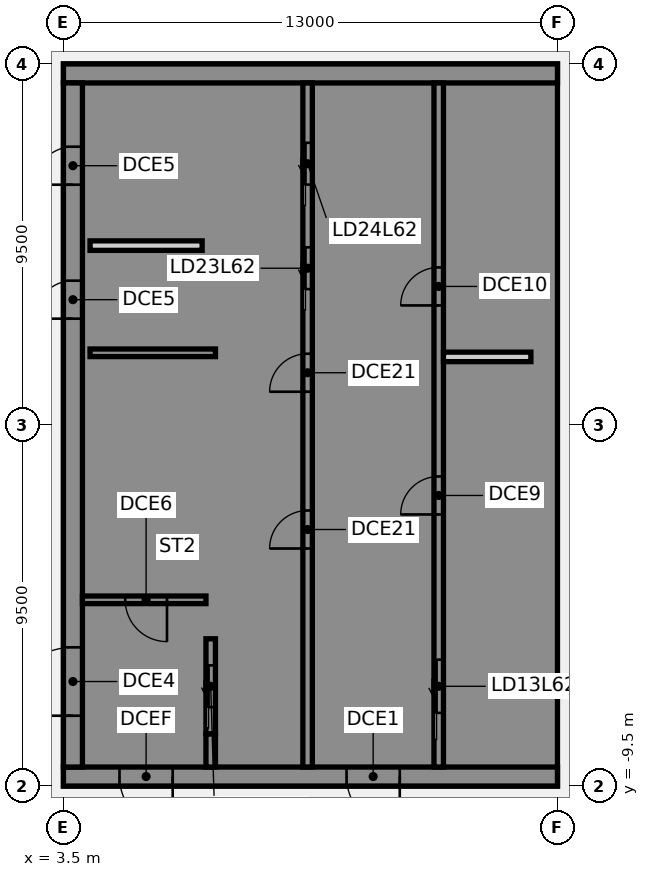
"""IFC4 building model, lengths in metres.
Left out: names, types, materials, properties, quantities, classifications, styles, units other than length and angle.
Written with IfcOpenShell. Run it as: python <this file> out.ifc"""

import sys

from ifc_helpers import new_model, si_unit, direction, frame, frame_2d, origin, place, context, subcontext, project, spatial, polyline, rectangle, outline, extrude, element, fill, save


model = new_model("IFC4")
c1 = context("Model", 3, precision=1e-05, world=origin(), true_north=direction((0.0, 1.0)))
c2 = subcontext(c1, "Body", "Model", "MODEL_VIEW")
j1 = project(units=[si_unit("LENGTHUNIT", "METRE"), si_unit("PLANEANGLEUNIT", "RADIAN")], contexts=[c1])
p1 = place(None, origin())
s1 = spatial("IfcSite", under=j1, at=p1, CompositionType="ELEMENT")
p2 = place(p1, origin())
s2 = spatial("IfcBuilding", under=s1, at=p2, CompositionType="ELEMENT")
p3 = place(p2, frame((0.0, 0.0, 245.1)))
s3 = spatial("IfcBuildingStorey", under=s2, at=p3, CompositionType="ELEMENT", Elevation=245.1)
p4 = place(p3, frame((16.5, -9.25, 0.0), z_axis=(0.0, 0.0, 1.0), x_axis=(-1.0, 0.0, 0.0)))
e1 = element("IfcWall", 1, at=p4, inside=s3, PredefinedType="SHEAR", context=c2, shape_type="SweptSolid", body=[
    extrude(rectangle(XDim=13.0, YDim=0.5, at=frame_2d((6.5, 0.0))), origin(), (0.0, 0.0, 1.0), 3.46),
])
p5 = place(p4, frame((4.15, 0.0, 0.0)))
e2 = element("IfcOpeningElement", 2, at=p5, cuts=e1, PredefinedType="OPENING", context=c2, shape_type="SweptSolid", body=[
    extrude(rectangle(XDim=1.4, YDim=2.1, at=frame_2d((0.7, 1.05))), frame((0.0, 0.26, 0.0), z_axis=(0.0, -1.0, 0.0), x_axis=(1.0, 0.0, 0.0)), (0.0, 0.0, 1.0), 0.52),
])
p6 = place(p4, frame((10.125, 0.0, 0.0)))
e3 = element("IfcOpeningElement", 3, at=p6, cuts=e1, PredefinedType="OPENING", context=c2, shape_type="SweptSolid", body=[
    extrude(rectangle(XDim=1.4, YDim=2.1, at=frame_2d((0.7, 1.05))), frame((0.0, 0.26, 0.0), z_axis=(0.0, -1.0, 0.0), x_axis=(1.0, 0.0, 0.0)), (0.0, 0.0, 1.0), 0.52),
])
p7 = place(p3, origin())
e4 = element("IfcWall", 4, at=p7, inside=s3, PredefinedType="SHEAR", context=c2, shape_type="SweptSolid", body=[
    extrude(outline(polyline([(13.5, -8.125), (13.5, -9.0), (16.0, -9.0), (16.5, -9.0), (16.5, 9.0), (16.0, 9.0), (13.5, 9.0), (13.5, 8.125), (16.0, 8.125), (16.0, 5.625), (13.5, 5.625), (13.5, 5.375), (16.0, 5.375), (16.0, -5.375), (13.5, -5.375), (13.5, -5.625), (16.0, -5.625), (16.0, -8.125), (13.5, -8.125)])), origin(), (0.0, 0.0, 1.0), 3.46),
])
p8 = place(p3, frame((16.5, 9.25, 0.0), z_axis=(0.0, 0.0, 1.0), x_axis=(-1.0, 0.0, 0.0)))
e5 = element("IfcWall", 5, at=p8, inside=s3, PredefinedType="SHEAR", context=c2, shape_type="SweptSolid", body=[
    extrude(rectangle(XDim=13.0, YDim=0.5, at=frame_2d((6.5, 0.0))), origin(), (0.0, 0.0, 1.0), 3.46),
])
p9 = place(p3, origin())
e6 = element("IfcWall", 6, at=p9, inside=s3, PredefinedType="SHEAR", context=c2, shape_type="SweptSolid", body=[
    extrude(outline(polyline([(9.8, -5.375), (7.5, -5.375), (7.5, 2.625), (9.8, 2.625), (9.8, 2.875), (7.5, 2.875), (7.5, 5.375), (9.8, 5.375), (9.8, 5.625), (7.5, 5.625), (7.5, 8.125), (9.8, 8.125), (9.8, 9.0), (7.5, 9.0), (7.25, 9.0), (7.25, -5.625), (7.5, -5.625), (9.8, -5.625), (9.8, -5.375)])), origin(), (0.0, 0.0, 1.0), 3.46),
])
p10 = place(p3, origin())
e7 = element("IfcWall", 7, at=p10, inside=s3, PredefinedType="SHEAR", context=c2, shape_type="SweptSolid", body=[
    extrude(outline(polyline([(7.5, -8.125), (7.5, -9.0), (9.8, -9.0), (9.8, -8.125), (9.8, -5.625), (9.55, -5.625), (9.55, -8.125), (7.5, -8.125)])), origin(), (0.0, 0.0, 1.0), 3.46),
])
p11 = place(p3, frame((7.375, -9.0, 0.0), z_axis=(0.0, 0.0, 1.0), x_axis=(0.0, 1.0, 0.0)))
e8 = element("IfcWall", 8, at=p11, inside=s3, PredefinedType="SHEAR", context=c2, shape_type="SweptSolid", body=[
    extrude(rectangle(XDim=0.875, YDim=0.25, at=frame_2d((0.438, 0.0))), origin(), (0.0, 0.0, 1.0), 3.46),
])
p12 = place(p3, frame((7.5, 1.9, 0.0), z_axis=(0.0, 0.0, 1.0), x_axis=(-1.0, 0.0, 0.0)))
e9 = element("IfcWall", 9, at=p12, inside=s3, PredefinedType="SHEAR", context=c2, shape_type="SweptSolid", body=[
    extrude(rectangle(XDim=3.3, YDim=0.2, at=frame_2d((1.65, 0.0))), origin(), (0.0, 0.0, 1.0), 3.46),
])
p13 = place(p3, frame((13.375, -9.0, 0.0), z_axis=(0.0, 0.0, 1.0), x_axis=(0.0, 1.0, 0.0)))
e10 = element("IfcWall", 10, at=p13, inside=s3, PredefinedType="SHEAR", context=c2, shape_type="SweptSolid", body=[
    extrude(rectangle(XDim=18.0, YDim=0.25, at=frame_2d((9.0, 0.0))), origin(), (0.0, 0.0, 1.0), 3.46),
])
p14 = place(p13, frame((1.425, 0.0, 0.0)))
e11 = element("IfcOpeningElement", 11, at=p14, cuts=e10, PredefinedType="OPENING", context=c2, shape_type="SweptSolid", body=[
    extrude(rectangle(XDim=1.4, YDim=2.1, at=frame_2d((0.7, 1.05))), frame((0.0, 0.135, 0.0), z_axis=(0.0, -1.0, 0.0), x_axis=(1.0, 0.0, 0.0)), (0.0, 0.0, 1.0), 0.27),
])
p15 = place(p13, frame((6.646, 0.0, 0.0)))
e12 = element("IfcOpeningElement", 12, at=p15, cuts=e10, PredefinedType="OPENING", context=c2, shape_type="SweptSolid", body=[
    extrude(rectangle(XDim=1.0, YDim=2.1, at=frame_2d((0.5, 1.05))), frame((0.0, 0.135, 0.0), z_axis=(0.0, -1.0, 0.0), x_axis=(1.0, 0.0, 0.0)), (0.0, 0.0, 1.0), 0.27),
])
p16 = place(p13, frame((12.146, 0.0, 0.0)))
e13 = element("IfcOpeningElement", 13, at=p16, cuts=e10, PredefinedType="OPENING", context=c2, shape_type="SweptSolid", body=[
    extrude(rectangle(XDim=1.0, YDim=2.1, at=frame_2d((0.5, 1.05))), frame((0.0, 0.135, 0.0), z_axis=(0.0, -1.0, 0.0), x_axis=(1.0, 0.0, 0.0)), (0.0, 0.0, 1.0), 0.27),
])
p17 = place(p3, frame((9.925, -9.0, 0.0), z_axis=(0.0, 0.0, 1.0), x_axis=(0.0, 1.0, 0.0)))
e14 = element("IfcWall", 14, at=p17, inside=s3, PredefinedType="SHEAR", context=c2, shape_type="SweptSolid", body=[
    extrude(rectangle(XDim=18.0, YDim=0.25, at=frame_2d((9.0, 0.0))), origin(), (0.0, 0.0, 1.0), 3.46),
])
p18 = place(p17, frame((12.575, 0.0, 0.0)))
e15 = element("IfcOpeningElement", 15, at=p18, cuts=e14, PredefinedType="OPENING", context=c2, shape_type="SweptSolid", body=[
    extrude(rectangle(XDim=1.1, YDim=2.1, at=frame_2d((0.55, 1.05))), frame((0.0, 0.135, 0.0), z_axis=(0.0, -1.0, 0.0), x_axis=(1.0, 0.0, 0.0)), (0.0, 0.0, 1.0), 0.27),
])
p19 = place(p17, frame((15.325, 0.0, 0.0)))
e16 = element("IfcOpeningElement", 16, at=p19, cuts=e14, PredefinedType="OPENING", context=c2, shape_type="SweptSolid", body=[
    extrude(rectangle(XDim=1.1, YDim=2.1, at=frame_2d((0.55, 1.05))), frame((0.0, 0.135, 0.0), z_axis=(0.0, -1.0, 0.0), x_axis=(1.0, 0.0, 0.0)), (0.0, 0.0, 1.0), 0.27),
])
p20 = place(p17, frame((5.75, 0.0, 0.0)))
e17 = element("IfcOpeningElement", 17, at=p20, cuts=e14, PredefinedType="OPENING", context=c2, shape_type="SweptSolid", body=[
    extrude(rectangle(XDim=1.0, YDim=2.1, at=frame_2d((0.5, 1.05))), frame((0.0, 0.135, 0.0), z_axis=(0.0, -1.0, 0.0), x_axis=(1.0, 0.0, 0.0)), (0.0, 0.0, 1.0), 0.27),
])
p21 = place(p17, frame((9.875, 0.0, 0.0)))
e18 = element("IfcOpeningElement", 18, at=p21, cuts=e14, PredefinedType="OPENING", context=c2, shape_type="SweptSolid", body=[
    extrude(rectangle(XDim=1.0, YDim=2.1, at=frame_2d((0.5, 1.05))), frame((0.0, 0.135, 0.0), z_axis=(0.0, -1.0, 0.0), x_axis=(1.0, 0.0, 0.0)), (0.0, 0.0, 1.0), 0.27),
])
p22 = place(p3, frame((7.375, -8.125, 0.0), z_axis=(0.0, 0.0, 1.0), x_axis=(0.0, 1.0, 0.0)))
e19 = element("IfcWall", 19, at=p22, inside=s3, PredefinedType="SHEAR", context=c2, shape_type="SweptSolid", body=[
    extrude(rectangle(XDim=2.5, YDim=0.25, at=frame_2d((1.25, 0.0))), origin(), (0.0, 0.0, 1.0), 3.46),
])
p23 = place(p22, frame((0.7, 0.0, 0.0)))
e20 = element("IfcOpeningElement", 20, at=p23, cuts=e19, PredefinedType="OPENING", context=c2, shape_type="SweptSolid", body=[
    extrude(rectangle(XDim=1.1, YDim=2.1, at=frame_2d((0.55, 1.05))), frame((0.0, 0.135, 0.0), z_axis=(0.0, -1.0, 0.0), x_axis=(1.0, 0.0, 0.0)), (0.0, 0.0, 1.0), 0.27),
])
p24 = place(p3, frame((3.75, -9.0, 0.0), z_axis=(0.0, 0.0, 1.0), x_axis=(0.0, 1.0, 0.0)))
e21 = element("IfcWall", 21, at=p24, inside=s3, PredefinedType="SHEAR", context=c2, shape_type="SweptSolid", body=[
    extrude(rectangle(XDim=18.0, YDim=0.5, at=frame_2d((9.0, 0.0))), origin(), (0.0, 0.0, 1.0), 3.46),
])
p25 = place(p24, frame((1.35, 0.0, 0.0)))
e22 = element("IfcOpeningElement", 22, at=p25, cuts=e21, PredefinedType="OPENING", context=c2, shape_type="SweptSolid", body=[
    extrude(rectangle(XDim=1.8, YDim=2.1, at=frame_2d((0.9, 1.05))), frame((0.0, 0.26, 0.0), z_axis=(0.0, -1.0, 0.0), x_axis=(1.0, 0.0, 0.0)), (0.0, 0.0, 1.0), 0.52),
])
p26 = place(p24, frame((11.798, 0.0, 0.0)))
e23 = element("IfcOpeningElement", 23, at=p26, cuts=e21, PredefinedType="OPENING", context=c2, shape_type="SweptSolid", body=[
    extrude(rectangle(XDim=1.0, YDim=2.1, at=frame_2d((0.5, 1.05))), frame((0.0, 0.26, 0.0), z_axis=(0.0, -1.0, 0.0), x_axis=(1.0, 0.0, 0.0)), (0.0, 0.0, 1.0), 0.52),
])
p27 = place(p24, frame((15.323, 0.0, 0.0)))
e24 = element("IfcOpeningElement", 24, at=p27, cuts=e21, PredefinedType="OPENING", context=c2, shape_type="SweptSolid", body=[
    extrude(rectangle(XDim=1.0, YDim=2.1, at=frame_2d((0.5, 1.05))), frame((0.0, 0.26, 0.0), z_axis=(0.0, -1.0, 0.0), x_axis=(1.0, 0.0, 0.0)), (0.0, 0.0, 1.0), 0.52),
])
p28 = place(p3, frame((7.15, 4.72, 0.0), z_axis=(0.0, 0.0, 1.0), x_axis=(-1.0, 0.0, 0.0)))
e25 = element("IfcWall", 25, at=p28, inside=s3, PredefinedType="PARTITIONING", context=c2, shape_type="SweptSolid", body=[
    extrude(rectangle(XDim=2.95, YDim=0.25, at=frame_2d((1.475, 0.0))), origin(), (0.0, 0.0, 1.0), 3.46),
])
p29 = place(p3, frame((7.25, -4.6, 0.0), z_axis=(0.0, 0.0, 1.0), x_axis=(-1.0, 0.0, 0.0)))
e26 = element("IfcWall", 26, at=p29, inside=s3, PredefinedType="SHEAR", context=c2, shape_type="SweptSolid", body=[
    extrude(rectangle(XDim=3.25, YDim=0.2, at=frame_2d((1.625, 0.0))), origin(), (0.0, 0.0, 1.0), 3.46),
])
p30 = place(p29, frame((1.025, 0.0, 0.0)))
e27 = element("IfcOpeningElement", 27, at=p30, cuts=e26, PredefinedType="OPENING", context=c2, shape_type="SweptSolid", body=[
    extrude(rectangle(XDim=1.1, YDim=2.1, at=frame_2d((0.55, 1.05))), frame((0.0, 0.11, 0.0), z_axis=(0.0, -1.0, 0.0), x_axis=(1.0, 0.0, 0.0)), (0.0, 0.0, 1.0), 0.22),
])
p31 = place(p3, frame((15.8, 1.792, 0.0), z_axis=(0.0, 0.0, 1.0), x_axis=(-1.0, 0.0, 0.0)))
e28 = element("IfcWall", 28, at=p31, inside=s3, PredefinedType="PARTITIONING", context=c2, shape_type="SweptSolid", body=[
    extrude(rectangle(XDim=2.3, YDim=0.25, at=frame_2d((1.15, 0.0))), origin(), (0.0, 0.0, 1.0), 3.46),
])
p32 = place(p5, origin())
e29 = element("IfcDoor", 29, at=p32, inside=s3, OperationType="SINGLE_SWING_LEFT", PredefinedType="DOOR", context=c2, shape_type="SweptSolid", body=[
    extrude(rectangle(XDim=1.4, YDim=2.1, at=frame_2d((0.7, 1.05))), frame((0.0, 0.025, 0.0), z_axis=(0.0, -1.0, 0.0), x_axis=(1.0, 0.0, 0.0)), (0.0, 0.0, 1.0), 0.05),
])
fill(e2, e29)
p33 = place(p6, origin())
e30 = element("IfcDoor", 30, at=p33, inside=s3, OperationType="SINGLE_SWING_LEFT", PredefinedType="DOOR", context=c2, shape_type="SweptSolid", body=[
    extrude(rectangle(XDim=1.4, YDim=2.1, at=frame_2d((0.7, 1.05))), frame((0.0, 0.025, 0.0), z_axis=(0.0, -1.0, 0.0), x_axis=(1.0, 0.0, 0.0)), (0.0, 0.0, 1.0), 0.05),
])
fill(e3, e30)
p34 = place(p25, origin())
e31 = element("IfcDoor", 31, at=p34, inside=s3, OperationType="SINGLE_SWING_LEFT", PredefinedType="DOOR", context=c2, shape_type="SweptSolid", body=[
    extrude(rectangle(XDim=1.8, YDim=2.1, at=frame_2d((0.9, 1.05))), frame((0.0, 0.025, 0.0), z_axis=(0.0, -1.0, 0.0), x_axis=(1.0, 0.0, 0.0)), (0.0, 0.0, 1.0), 0.05),
])
fill(e22, e31)
p35 = place(p26, origin())
e32 = element("IfcDoor", 32, at=p35, inside=s3, OperationType="SINGLE_SWING_LEFT", PredefinedType="DOOR", context=c2, shape_type="SweptSolid", body=[
    extrude(rectangle(XDim=1.0, YDim=2.1, at=frame_2d((0.5, 1.05))), frame((0.0, -0.175, 0.0), z_axis=(0.0, -1.0, 0.0), x_axis=(1.0, 0.0, 0.0)), (0.0, 0.0, 1.0), 0.05),
])
fill(e23, e32)
p36 = place(p27, origin())
e33 = element("IfcDoor", 33, at=p36, inside=s3, OperationType="SINGLE_SWING_LEFT", PredefinedType="DOOR", context=c2, shape_type="SweptSolid", body=[
    extrude(rectangle(XDim=1.0, YDim=2.1, at=frame_2d((0.5, 1.05))), frame((0.0, -0.175, 0.0), z_axis=(0.0, -1.0, 0.0), x_axis=(1.0, 0.0, 0.0)), (0.0, 0.0, 1.0), 0.05),
])
fill(e24, e33)
p37 = place(p30, origin())
e34 = element("IfcDoor", 34, at=p37, inside=s3, OperationType="SINGLE_SWING_LEFT", PredefinedType="DOOR", context=c2, shape_type="SweptSolid", body=[
    extrude(rectangle(XDim=1.1, YDim=2.1, at=frame_2d((0.55, 1.05))), frame((0.0, 0.025, 0.0), z_axis=(0.0, -1.0, 0.0), x_axis=(1.0, 0.0, 0.0)), (0.0, 0.0, 1.0), 0.05),
])
fill(e27, e34)
p38 = place(p14, origin())
e35 = element("IfcDoor", 35, at=p38, inside=s3, OperationType="SLIDING_TO_LEFT", PredefinedType="DOOR", context=c2, shape_type="SweptSolid", body=[
    extrude(rectangle(XDim=1.4, YDim=2.1, at=frame_2d((0.7, 1.05))), frame((0.0, 0.025, 0.0), z_axis=(0.0, -1.0, 0.0), x_axis=(1.0, 0.0, 0.0)), (0.0, 0.0, 1.0), 0.05),
])
fill(e11, e35)
p39 = place(p23, origin())
e36 = element("IfcDoor", 36, at=p39, inside=s3, OperationType="SLIDING_TO_LEFT", PredefinedType="DOOR", context=c2, shape_type="SweptSolid", body=[
    extrude(rectangle(XDim=1.1, YDim=2.1, at=frame_2d((0.55, 1.05))), frame((0.0, 0.025, 0.0), z_axis=(0.0, -1.0, 0.0), x_axis=(1.0, 0.0, 0.0)), (0.0, 0.0, 1.0), 0.05),
])
fill(e20, e36)
p40 = place(p18, origin())
e37 = element("IfcDoor", 37, at=p40, inside=s3, OperationType="SLIDING_TO_LEFT", PredefinedType="DOOR", context=c2, shape_type="SweptSolid", body=[
    extrude(rectangle(XDim=1.1, YDim=2.1, at=frame_2d((0.55, 1.05))), frame((0.0, 0.025, 0.0), z_axis=(0.0, -1.0, 0.0), x_axis=(1.0, 0.0, 0.0)), (0.0, 0.0, 1.0), 0.05),
])
fill(e15, e37)
p41 = place(p19, origin())
e38 = element("IfcDoor", 38, at=p41, inside=s3, OperationType="SLIDING_TO_LEFT", PredefinedType="DOOR", context=c2, shape_type="SweptSolid", body=[
    extrude(rectangle(XDim=1.1, YDim=2.1, at=frame_2d((0.55, 1.05))), frame((0.0, 0.025, 0.0), z_axis=(0.0, -1.0, 0.0), x_axis=(1.0, 0.0, 0.0)), (0.0, 0.0, 1.0), 0.05),
])
fill(e16, e38)
p42 = place(p15, origin())
e39 = element("IfcDoor", 39, at=p42, inside=s3, OperationType="SINGLE_SWING_LEFT", PredefinedType="DOOR", context=c2, shape_type="SweptSolid", body=[
    extrude(rectangle(XDim=1.0, YDim=2.1, at=frame_2d((0.5, 1.05))), frame((0.0, 0.025, 0.0), z_axis=(0.0, -1.0, 0.0), x_axis=(1.0, 0.0, 0.0)), (0.0, 0.0, 1.0), 0.05),
])
fill(e12, e39)
p43 = place(p16, origin())
e40 = element("IfcDoor", 40, at=p43, inside=s3, OperationType="SINGLE_SWING_LEFT", PredefinedType="DOOR", context=c2, shape_type="SweptSolid", body=[
    extrude(rectangle(XDim=1.0, YDim=2.1, at=frame_2d((0.5, 1.05))), frame((0.0, 0.025, 0.0), z_axis=(0.0, -1.0, 0.0), x_axis=(1.0, 0.0, 0.0)), (0.0, 0.0, 1.0), 0.05),
])
fill(e13, e40)
p44 = place(p20, origin())
e41 = element("IfcDoor", 41, at=p44, inside=s3, OperationType="SINGLE_SWING_LEFT", PredefinedType="DOOR", context=c2, shape_type="SweptSolid", body=[
    extrude(rectangle(XDim=1.0, YDim=2.1, at=frame_2d((0.5, 1.05))), frame((0.0, 0.025, 0.0), z_axis=(0.0, -1.0, 0.0), x_axis=(1.0, 0.0, 0.0)), (0.0, 0.0, 1.0), 0.05),
])
fill(e17, e41)
p45 = place(p21, origin())
e42 = element("IfcDoor", 42, at=p45, inside=s3, OperationType="SINGLE_SWING_LEFT", PredefinedType="DOOR", context=c2, shape_type="SweptSolid", body=[
    extrude(rectangle(XDim=1.0, YDim=2.1, at=frame_2d((0.5, 1.05))), frame((0.0, 0.025, 0.0), z_axis=(0.0, -1.0, 0.0), x_axis=(1.0, 0.0, 0.0)), (0.0, 0.0, 1.0), 0.05),
])
fill(e18, e42)
save(model, sys.argv[1])
